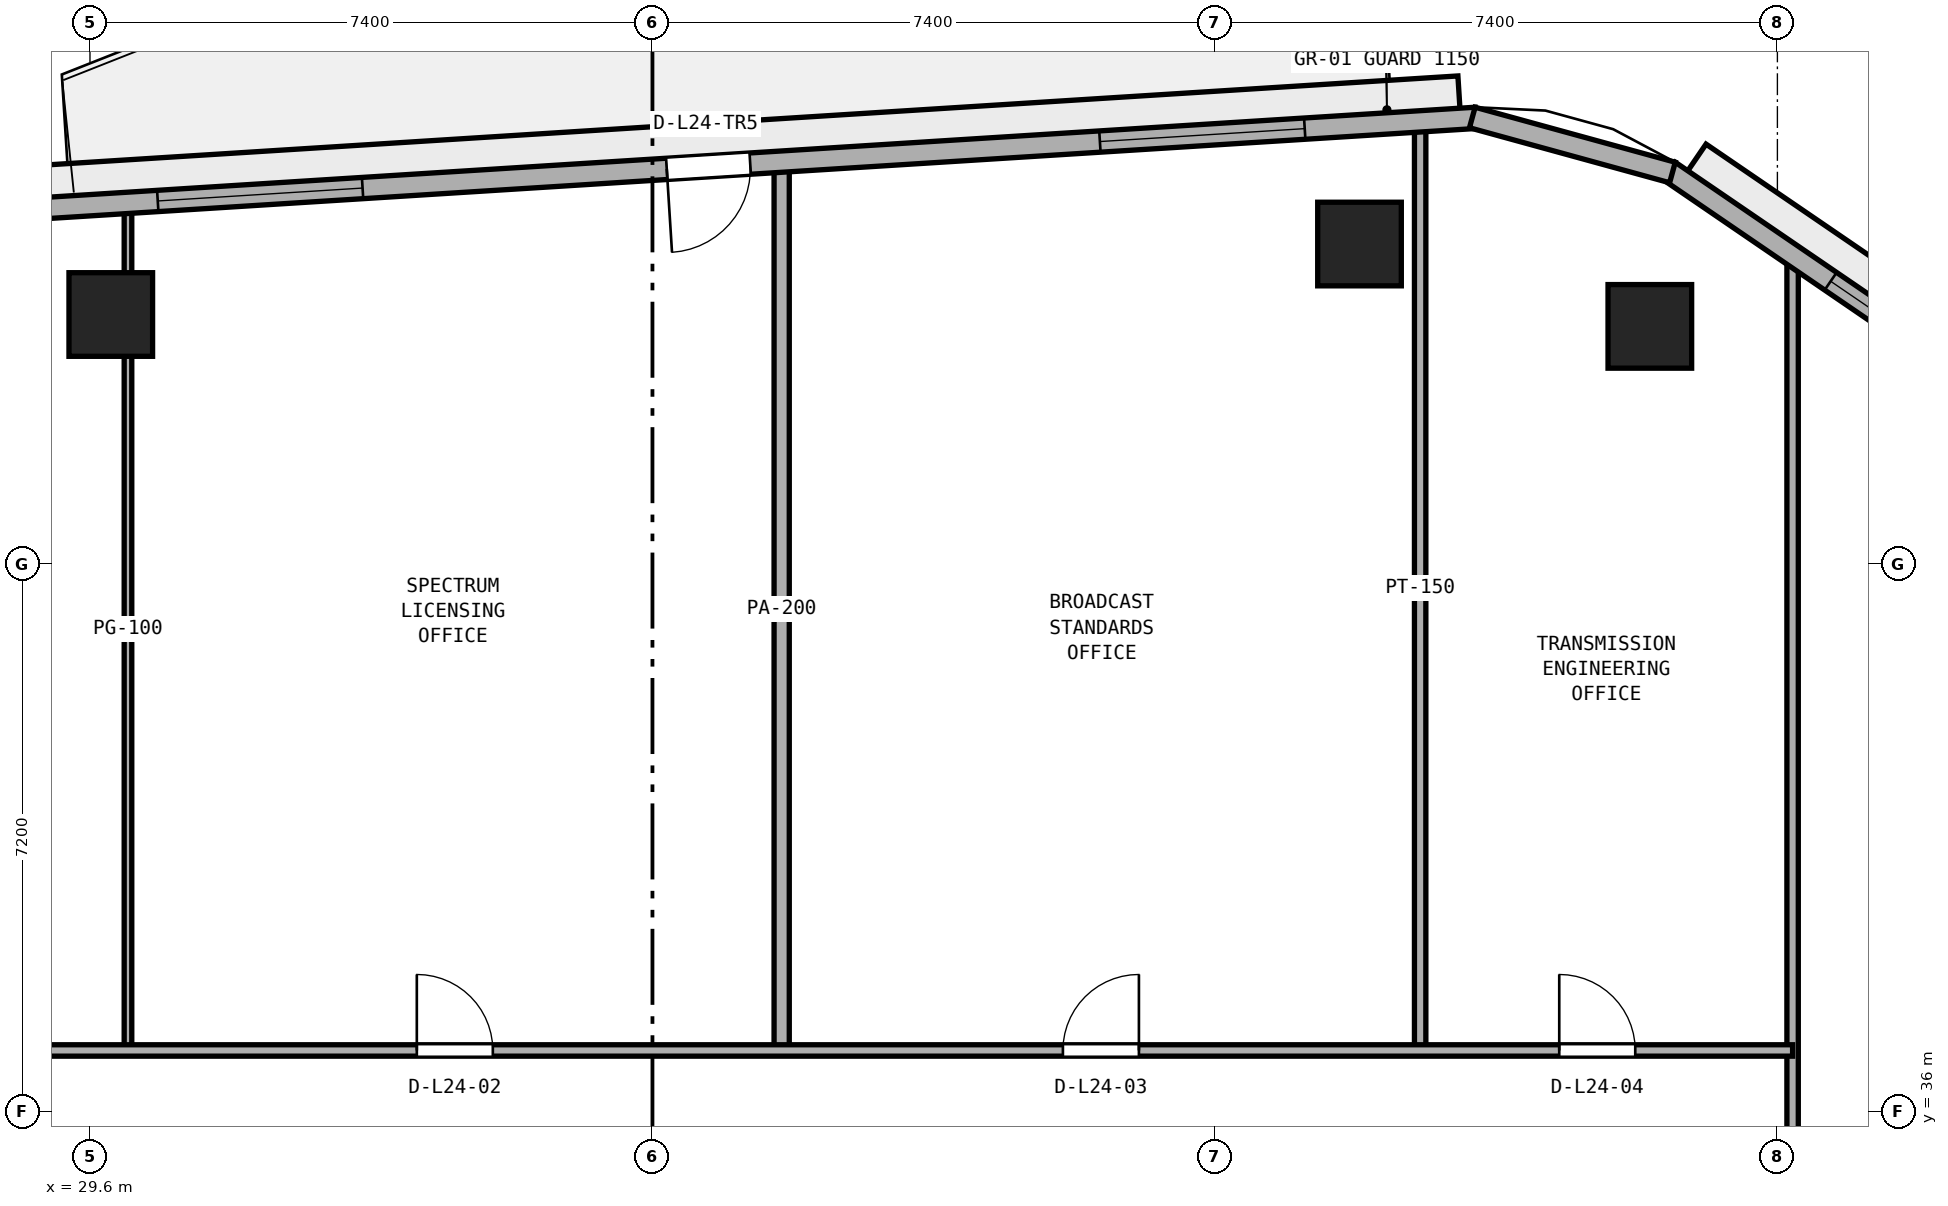
"""IFC4 building model, lengths in metres.
Left out: names, types, materials, properties, quantities, classifications, styles, units other than length and angle.
Written with IfcOpenShell. Run it as: python <this file> out.ifc"""

import sys

from ifc_helpers import new_model, si_unit, direction, frame, frame_2d, origin, origin_2d, place, context, subcontext, project, spatial, rectangle, extrude, element, fill, save


model = new_model("IFC4")
c1 = context("Model", 3, precision=1e-05, world=origin(), true_north=direction((0.0, 1.0)))
c2 = subcontext(c1, "Body", "Model", "MODEL_VIEW")
j1 = project(units=[si_unit("LENGTHUNIT", "METRE"), si_unit("PLANEANGLEUNIT", "RADIAN")], contexts=[c1])
p1 = place(None, origin())
s1 = spatial("IfcSite", under=j1, at=p1, CompositionType="ELEMENT")
p2 = place(p1, origin())
s2 = spatial("IfcBuilding", under=s1, at=p2, CompositionType="ELEMENT")
p3 = place(p2, frame((0.0, 0.0, 97.2)))
s3 = spatial("IfcBuildingStorey", under=s2, at=p3, CompositionType="ELEMENT", Elevation=97.2)
for number, where, z_axis, x_axis in (
    (1, (50.122, 46.326, 0.0), (0.0, 0.0, 1.0), (1.0, 0.0, 0.0)),
    (2, (46.302, 47.409, 0.0), (0.0, 0.0, 1.0), (1.0, 0.0, 0.0)),
    (3, (29.874, 46.482, 0.0), (0.0, 0.0, 1.0), (1.0, 0.0, 0.0)),
):
    element("IfcColumn", number, at=place(p3, frame(where, z_axis=z_axis, x_axis=x_axis)), inside=s3, PredefinedType="COLUMN", context=c2, shape_type="SweptSolid", body=[
        extrude(rectangle(XDim=1.1, YDim=1.1, at=origin_2d()), origin(), (0.0, 0.0, 1.0), 3.8),
    ])
p4 = place(p3, frame((52.0, 13.6, 0.0), z_axis=(0.0, 0.0, 1.0), x_axis=(0.0, 1.0, 0.0)))
e4 = element("IfcWall", 4, at=p4, inside=s3, PredefinedType="PARTITIONING", context=c2, shape_type="SweptSolid", body=[
    extrude(rectangle(XDim=33.691, YDim=0.15, at=frame_2d((16.846, 0.0))), origin(), (0.0, 0.0, 1.0), 3.525),
])
p5 = place(p4, frame((6.075, 0.0, 0.0)))
e5 = element("IfcOpeningElement", 5, at=p5, cuts=e4, PredefinedType="OPENING", context=c2, shape_type="SweptSolid", body=[
    extrude(rectangle(XDim=1.0, YDim=2.12, at=frame_2d((0.5, 1.06))), frame((0.0, 0.085, 0.0), z_axis=(0.0, -1.0, 0.0), x_axis=(1.0, 0.0, 0.0)), (0.0, 0.0, 1.0), 0.17),
])
p6 = place(p4, frame((12.6, 0.0, 0.0)))
e6 = element("IfcOpeningElement", 6, at=p6, cuts=e4, PredefinedType="OPENING", context=c2, shape_type="SweptSolid", body=[
    extrude(rectangle(XDim=1.0, YDim=2.12, at=frame_2d((0.5, 1.06))), frame((0.0, 0.085, 0.0), z_axis=(0.0, -1.0, 0.0), x_axis=(1.0, 0.0, 0.0)), (0.0, 0.0, 1.0), 0.17),
])
p7 = place(p4, frame((19.35, 0.0, 0.0)))
e7 = element("IfcOpeningElement", 7, at=p7, cuts=e4, PredefinedType="OPENING", context=c2, shape_type="SweptSolid", body=[
    extrude(rectangle(XDim=1.0, YDim=2.12, at=frame_2d((0.5, 1.06))), frame((0.0, 0.085, 0.0), z_axis=(0.0, -1.0, 0.0), x_axis=(1.0, 0.0, 0.0)), (0.0, 0.0, 1.0), 0.17),
])
p8 = place(p3, frame((47.1, 36.8, 0.0), z_axis=(0.0, 0.0, 1.0), x_axis=(0.0, 1.0, 0.0)))
e8 = element("IfcWall", 8, at=p8, inside=s3, PredefinedType="PARTITIONING", context=c2, shape_type="SweptSolid", body=[
    extrude(rectangle(XDim=12.158, YDim=0.15, at=frame_2d((6.079, 0.0))), origin(), (0.0, 0.0, 1.0), 3.525),
])
p9 = place(p3, frame((38.7, 36.8, 0.0), z_axis=(0.0, 0.0, 1.0), x_axis=(0.0, 1.0, 0.0)))
e9 = element("IfcWall", 9, at=p9, inside=s3, PredefinedType="PARTITIONING", context=c2, shape_type="SweptSolid", body=[
    extrude(rectangle(XDim=11.629, YDim=0.2, at=frame_2d((5.814, 0.0))), origin(), (0.0, 0.0, 1.0), 3.525),
])
p10 = place(p3, frame((30.1, 36.8, 0.0), z_axis=(0.0, 0.0, 1.0), x_axis=(0.0, 1.0, 0.0)))
e10 = element("IfcWall", 10, at=p10, inside=s3, PredefinedType="PARTITIONING", context=c2, shape_type="SweptSolid", body=[
    extrude(rectangle(XDim=11.086, YDim=0.1, at=frame_2d((5.543, 0.0))), origin(), (0.0, 0.0, 1.0), 3.525),
])
p11 = place(p3, frame((22.0, 36.8, 0.0), z_axis=(0.0, 0.0, 1.0), x_axis=(1.0, 0.0, 0.0)))
e11 = element("IfcWall", 11, at=p11, inside=s3, PredefinedType="PARTITIONING", context=c2, shape_type="SweptSolid", body=[
    extrude(rectangle(XDim=30.0, YDim=0.15, at=frame_2d((15.0, 0.0))), origin(), (0.0, 0.0, 1.0), 3.525),
])
p12 = place(p11, frame((3.67, 0.0, 0.0)))
e12 = element("IfcOpeningElement", 12, at=p12, cuts=e11, PredefinedType="OPENING", context=c2, shape_type="SweptSolid", body=[
    extrude(rectangle(XDim=1.0, YDim=2.12, at=frame_2d((0.5, 1.06))), frame((0.0, 0.085, 0.0), z_axis=(0.0, -1.0, 0.0), x_axis=(1.0, 0.0, 0.0)), (0.0, 0.0, 1.0), 0.17),
])
p13 = place(p11, frame((11.9, 0.0, 0.0)))
e13 = element("IfcOpeningElement", 13, at=p13, cuts=e11, PredefinedType="OPENING", context=c2, shape_type="SweptSolid", body=[
    extrude(rectangle(XDim=1.0, YDim=2.12, at=frame_2d((0.5, 1.06))), frame((0.0, 0.085, 0.0), z_axis=(0.0, -1.0, 0.0), x_axis=(1.0, 0.0, 0.0)), (0.0, 0.0, 1.0), 0.17),
])
p14 = place(p11, frame((20.4, 0.0, 0.0)))
e14 = element("IfcOpeningElement", 14, at=p14, cuts=e11, PredefinedType="OPENING", context=c2, shape_type="SweptSolid", body=[
    extrude(rectangle(XDim=1.0, YDim=2.12, at=frame_2d((0.5, 1.06))), frame((0.0, 0.085, 0.0), z_axis=(0.0, -1.0, 0.0), x_axis=(1.0, 0.0, 0.0)), (0.0, 0.0, 1.0), 0.17),
])
p15 = place(p11, frame((26.93, 0.0, 0.0)))
e15 = element("IfcOpeningElement", 15, at=p15, cuts=e11, PredefinedType="OPENING", context=c2, shape_type="SweptSolid", body=[
    extrude(rectangle(XDim=1.0, YDim=2.12, at=frame_2d((0.5, 1.06))), frame((0.0, 0.085, 0.0), z_axis=(0.0, -1.0, 0.0), x_axis=(1.0, 0.0, 0.0)), (0.0, 0.0, 1.0), 0.17),
])
p16 = place(p3, frame((64.29, 38.867, 0.0), z_axis=(0.0, 0.0, 1.0), x_axis=(-0.825755550159, 0.564028165416, 0.0)))
e16 = element("IfcWall", 16, at=p16, inside=s3, PredefinedType="STANDARD", context=c2, shape_type="SweptSolid", body=[
    extrude(rectangle(XDim=16.848, YDim=0.28, at=frame_2d((8.424, 0.0))), origin(), (0.0, 0.0, 1.0), 3.525),
])
p17 = place(p16, frame((1.792, 0.0, 0.9)))
e17 = element("IfcOpeningElement", 17, at=p17, cuts=e16, PredefinedType="OPENING", context=c2, shape_type="SweptSolid", body=[
    extrude(rectangle(XDim=2.7, YDim=1.75, at=frame_2d((1.35, 0.875))), frame((0.0, 0.15, 0.0), z_axis=(0.0, -1.0, 0.0), x_axis=(1.0, 0.0, 0.0)), (0.0, 0.0, 1.0), 0.3),
])
p18 = place(p16, frame((7.074, 0.0, 0.9)))
e18 = element("IfcOpeningElement", 18, at=p18, cuts=e16, PredefinedType="OPENING", context=c2, shape_type="SweptSolid", body=[
    extrude(rectangle(XDim=2.7, YDim=1.75, at=frame_2d((1.35, 0.875))), frame((0.0, 0.15, 0.0), z_axis=(0.0, -1.0, 0.0), x_axis=(1.0, 0.0, 0.0)), (0.0, 0.0, 1.0), 0.3),
])
p19 = place(p16, frame((11.577, 0.0, 0.9)))
e19 = element("IfcOpeningElement", 19, at=p19, cuts=e16, PredefinedType="OPENING", context=c2, shape_type="SweptSolid", body=[
    extrude(rectangle(XDim=2.7, YDim=1.75, at=frame_2d((1.35, 0.875))), frame((0.0, 0.15, 0.0), z_axis=(0.0, -1.0, 0.0), x_axis=(1.0, 0.0, 0.0)), (0.0, 0.0, 1.0), 0.3),
])
p20 = place(p3, frame((47.832, 49.069, 0.0), z_axis=(0.0, 0.0, 1.0), x_axis=(-0.998017725054, -0.062933460723, 0.0)))
e20 = element("IfcWall", 20, at=p20, inside=s3, PredefinedType="STANDARD", context=c2, shape_type="SweptSolid", body=[
    extrude(rectangle(XDim=19.629, YDim=0.28, at=frame_2d((9.815, 0.0))), origin(), (0.0, 0.0, 1.0), 3.525),
])
p21 = place(p20, frame((9.565, 0.0, 0.0)))
e21 = element("IfcOpeningElement", 21, at=p21, cuts=e20, PredefinedType="OPENING", context=c2, shape_type="SweptSolid", body=[
    extrude(rectangle(XDim=1.1, YDim=2.2, at=frame_2d((0.55, 1.1))), frame((0.0, 0.15, 0.0), z_axis=(0.0, -1.0, 0.0), x_axis=(1.0, 0.0, 0.0)), (0.0, 0.0, 1.0), 0.3),
])
p22 = place(p20, frame((2.255, 0.0, 0.9)))
e22 = element("IfcOpeningElement", 22, at=p22, cuts=e20, PredefinedType="OPENING", context=c2, shape_type="SweptSolid", body=[
    extrude(rectangle(XDim=2.7, YDim=1.75, at=frame_2d((1.35, 0.875))), frame((0.0, 0.15, 0.0), z_axis=(0.0, -1.0, 0.0), x_axis=(1.0, 0.0, 0.0)), (0.0, 0.0, 1.0), 0.3),
])
p23 = place(p20, frame((14.675, 0.0, 0.9)))
e23 = element("IfcOpeningElement", 23, at=p23, cuts=e20, PredefinedType="OPENING", context=c2, shape_type="SweptSolid", body=[
    extrude(rectangle(XDim=2.7, YDim=1.75, at=frame_2d((1.35, 0.875))), frame((0.0, 0.15, 0.0), z_axis=(0.0, -1.0, 0.0), x_axis=(1.0, 0.0, 0.0)), (0.0, 0.0, 1.0), 0.3),
])
p24 = place(p3, frame((50.419, 48.351, 0.0), z_axis=(0.0, 0.0, 1.0), x_axis=(-0.964254516967, 0.264977784933, 0.0)))
e24 = element("IfcWall", 24, at=p24, inside=s3, PredefinedType="STANDARD", context=c2, shape_type="SweptSolid", body=[
    extrude(rectangle(XDim=2.731, YDim=0.28, at=frame_2d((1.365, 0.0))), origin(), (0.0, 0.0, 1.0), 3.525),
])
p25 = place(p13, origin())
e25 = element("IfcDoor", 25, at=p25, inside=s3, OperationType="SINGLE_SWING_LEFT", PredefinedType="DOOR", context=c2, shape_type="SweptSolid", body=[
    extrude(rectangle(XDim=1.0, YDim=2.12, at=frame_2d((0.5, 1.06))), frame((0.0, 0.025, 0.0), z_axis=(0.0, -1.0, 0.0), x_axis=(1.0, 0.0, 0.0)), (0.0, 0.0, 1.0), 0.05),
])
fill(e13, e25)
p26 = place(p14, origin())
e26 = element("IfcDoor", 26, at=p26, inside=s3, OperationType="SINGLE_SWING_RIGHT", PredefinedType="DOOR", context=c2, shape_type="SweptSolid", body=[
    extrude(rectangle(XDim=1.0, YDim=2.12, at=frame_2d((0.5, 1.06))), frame((0.0, 0.025, 0.0), z_axis=(0.0, -1.0, 0.0), x_axis=(1.0, 0.0, 0.0)), (0.0, 0.0, 1.0), 0.05),
])
fill(e14, e26)
p27 = place(p15, origin())
e27 = element("IfcDoor", 27, at=p27, inside=s3, OperationType="SINGLE_SWING_LEFT", PredefinedType="DOOR", context=c2, shape_type="SweptSolid", body=[
    extrude(rectangle(XDim=1.0, YDim=2.12, at=frame_2d((0.5, 1.06))), frame((0.0, 0.025, 0.0), z_axis=(0.0, -1.0, 0.0), x_axis=(1.0, 0.0, 0.0)), (0.0, 0.0, 1.0), 0.05),
])
fill(e15, e27)
p28 = place(p19, origin())
e28 = element("IfcWindow", 28, at=p28, inside=s3, PartitioningType="SINGLE_PANEL", PredefinedType="WINDOW", context=c2, shape_type="SweptSolid", body=[
    extrude(rectangle(XDim=2.7, YDim=1.75, at=frame_2d((1.35, 0.875))), frame((0.0, 0.03, 0.0), z_axis=(0.0, -1.0, 0.0), x_axis=(1.0, 0.0, 0.0)), (0.0, 0.0, 1.0), 0.06),
])
fill(e19, e28)
p29 = place(p21, origin())
e29 = element("IfcDoor", 29, at=p29, inside=s3, OperationType="SINGLE_SWING_RIGHT", PredefinedType="DOOR", context=c2, shape_type="SweptSolid", body=[
    extrude(rectangle(XDim=1.1, YDim=2.2, at=frame_2d((0.55, 1.1))), frame((0.0, 0.025, 0.0), z_axis=(0.0, -1.0, 0.0), x_axis=(1.0, 0.0, 0.0)), (0.0, 0.0, 1.0), 0.05),
])
fill(e21, e29)
p30 = place(p22, origin())
e30 = element("IfcWindow", 30, at=p30, inside=s3, PartitioningType="SINGLE_PANEL", PredefinedType="WINDOW", context=c2, shape_type="SweptSolid", body=[
    extrude(rectangle(XDim=2.7, YDim=1.75, at=frame_2d((1.35, 0.875))), frame((0.0, 0.03, 0.0), z_axis=(0.0, -1.0, 0.0), x_axis=(1.0, 0.0, 0.0)), (0.0, 0.0, 1.0), 0.06),
])
fill(e22, e30)
p31 = place(p23, origin())
e31 = element("IfcWindow", 31, at=p31, inside=s3, PartitioningType="SINGLE_PANEL", PredefinedType="WINDOW", context=c2, shape_type="SweptSolid", body=[
    extrude(rectangle(XDim=2.7, YDim=1.75, at=frame_2d((1.35, 0.875))), frame((0.0, 0.03, 0.0), z_axis=(0.0, -1.0, 0.0), x_axis=(1.0, 0.0, 0.0)), (0.0, 0.0, 1.0), 0.06),
])
fill(e23, e31)
save(model, sys.argv[1])
